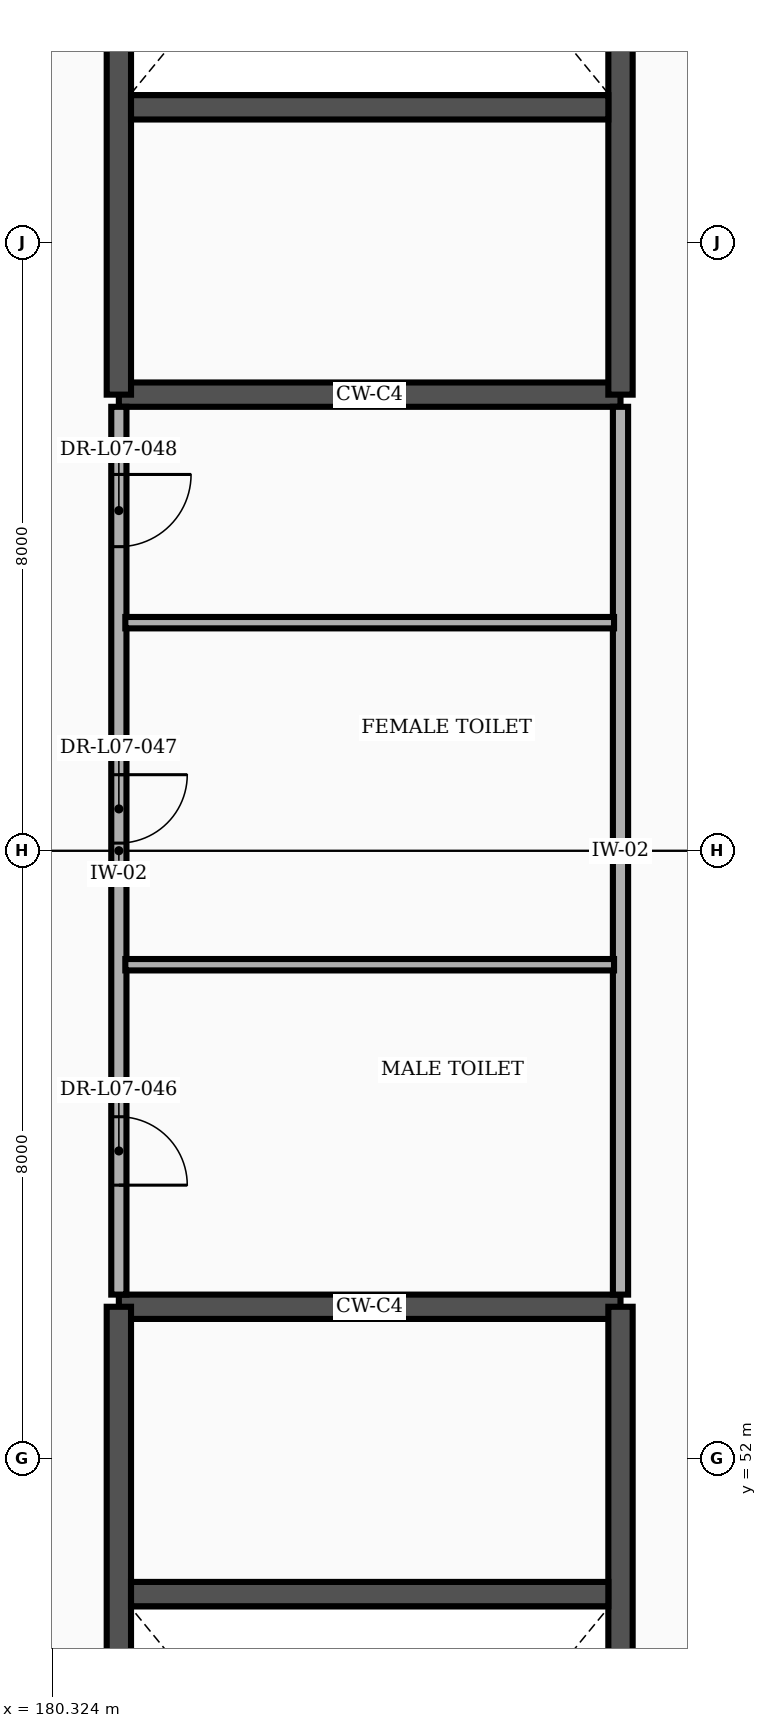
"""IFC4 building model, lengths in metres.
Left out: names, types, materials, properties, quantities, classifications, styles, units other than length and angle.
Written with IfcOpenShell. Run it as: python <this file> out.ifc"""

import sys

from ifc_helpers import new_model, si_unit, direction, frame, frame_2d, origin, place, context, subcontext, project, spatial, rectangle, extrude, element, fill, save


model = new_model("IFC4")
c1 = context("Model", 3, precision=1e-05, world=origin(), true_north=direction((0.0, 1.0)))
c2 = subcontext(c1, "Body", "Model", "MODEL_VIEW")
j1 = project(units=[si_unit("LENGTHUNIT", "METRE"), si_unit("PLANEANGLEUNIT", "RADIAN")], contexts=[c1])
p1 = place(None, origin())
s1 = spatial("IfcSite", under=j1, at=p1, CompositionType="ELEMENT")
p2 = place(p1, origin())
s2 = spatial("IfcBuilding", under=s1, at=p2, CompositionType="ELEMENT")
p3 = place(p2, frame((0.0, 0.0, 33.3)))
s3 = spatial("IfcBuildingStorey", under=s2, at=p3, CompositionType="ELEMENT", Elevation=33.3)
p4 = place(p3, frame((181.2, 54.0, 0.0), z_axis=(0.0, 0.0, 1.0), x_axis=(1.0, 0.0, 0.0)))
e1 = element("IfcWall", 1, at=p4, inside=s3, PredefinedType="SHEAR", context=c2, shape_type="SweptSolid", body=[
    extrude(rectangle(XDim=6.6, YDim=0.32, at=frame_2d((3.3, 0.0))), origin(), (0.0, 0.0, 1.0), 4.255),
])
p5 = place(p3, frame((181.2, 39.4, 0.0), z_axis=(0.0, 0.0, 1.0), x_axis=(0.0, 1.0, 0.0)))
e2 = element("IfcWall", 2, at=p5, inside=s3, PredefinedType="SHEAR", context=c2, shape_type="SweptSolid", body=[
    extrude(rectangle(XDim=14.6, YDim=0.32, at=frame_2d((7.3, 0.0))), origin(), (0.0, 0.0, 1.0), 4.255),
])
p6 = place(p5, frame((0.55, 0.0, 0.0)))
e3 = element("IfcOpeningElement", 3, at=p6, cuts=e2, PredefinedType="OPENING", context=c2, shape_type="SweptSolid", body=[
    extrude(rectangle(XDim=2.4, YDim=2.25, at=frame_2d((1.2, 1.125))), frame((0.0, 0.172, 0.0), z_axis=(0.0, -1.0, 0.0), x_axis=(1.0, 0.0, 0.0)), (0.0, 0.0, 1.0), 0.344),
])
p7 = place(p3, frame((187.8, 39.4, 0.0), z_axis=(0.0, 0.0, 1.0), x_axis=(0.0, 1.0, 0.0)))
e4 = element("IfcWall", 4, at=p7, inside=s3, PredefinedType="SHEAR", context=c2, shape_type="SweptSolid", body=[
    extrude(rectangle(XDim=14.6, YDim=0.32, at=frame_2d((7.3, 0.0))), origin(), (0.0, 0.0, 1.0), 4.255),
])
p8 = place(p3, frame((181.36, 50.22, 0.0), z_axis=(0.0, 0.0, 1.0), x_axis=(1.0, 0.0, 0.0)))
e5 = element("IfcWall", 5, at=p8, inside=s3, PredefinedType="SHEAR", context=c2, shape_type="SweptSolid", body=[
    extrude(rectangle(XDim=6.28, YDim=0.32, at=frame_2d((3.14, 0.0))), origin(), (0.0, 0.0, 1.0), 4.255),
])
p9 = place(p3, frame((181.2, 66.0, 0.0), z_axis=(0.0, 0.0, 1.0), x_axis=(1.0, 0.0, 0.0)))
e6 = element("IfcWall", 6, at=p9, inside=s3, PredefinedType="SHEAR", context=c2, shape_type="SweptSolid", body=[
    extrude(rectangle(XDim=6.6, YDim=0.32, at=frame_2d((3.3, 0.0))), origin(), (0.0, 0.0, 1.0), 4.255),
])
p10 = place(p3, frame((181.2, 66.0, 0.0), z_axis=(0.0, 0.0, 1.0), x_axis=(0.0, 1.0, 0.0)))
e7 = element("IfcWall", 7, at=p10, inside=s3, PredefinedType="SHEAR", context=c2, shape_type="SweptSolid", body=[
    extrude(rectangle(XDim=14.6, YDim=0.32, at=frame_2d((7.3, 0.0))), origin(), (0.0, 0.0, 1.0), 4.255),
])
p11 = place(p10, frame((11.65, 0.0, 0.0)))
e8 = element("IfcOpeningElement", 8, at=p11, cuts=e7, PredefinedType="OPENING", context=c2, shape_type="SweptSolid", body=[
    extrude(rectangle(XDim=2.4, YDim=2.25, at=frame_2d((1.2, 1.125))), frame((0.0, 0.172, 0.0), z_axis=(0.0, -1.0, 0.0), x_axis=(1.0, 0.0, 0.0)), (0.0, 0.0, 1.0), 0.344),
])
p12 = place(p3, frame((187.8, 66.0, 0.0), z_axis=(0.0, 0.0, 1.0), x_axis=(0.0, 1.0, 0.0)))
e9 = element("IfcWall", 9, at=p12, inside=s3, PredefinedType="SHEAR", context=c2, shape_type="SweptSolid", body=[
    extrude(rectangle(XDim=14.6, YDim=0.32, at=frame_2d((7.3, 0.0))), origin(), (0.0, 0.0, 1.0), 4.255),
])
p13 = place(p3, frame((181.36, 69.78, 0.0), z_axis=(0.0, 0.0, 1.0), x_axis=(1.0, 0.0, 0.0)))
e10 = element("IfcWall", 10, at=p13, inside=s3, PredefinedType="SHEAR", context=c2, shape_type="SweptSolid", body=[
    extrude(rectangle(XDim=6.28, YDim=0.32, at=frame_2d((3.14, 0.0))), origin(), (0.0, 0.0, 1.0), 4.255),
])
p14 = place(p3, frame((187.8, 54.16, 0.0), z_axis=(0.0, 0.0, 1.0), x_axis=(0.0, 1.0, 0.0)))
e11 = element("IfcWall", 11, at=p14, inside=s3, PredefinedType="PARTITIONING", context=c2, shape_type="SweptSolid", body=[
    extrude(rectangle(XDim=11.68, YDim=0.2, at=frame_2d((5.84, 0.0))), origin(), (0.0, 0.0, 1.0), 4.255),
])
p15 = place(p3, frame((181.2, 54.16, 0.0), z_axis=(0.0, 0.0, 1.0), x_axis=(0.0, 1.0, 0.0)))
e12 = element("IfcWall", 12, at=p15, inside=s3, PredefinedType="PARTITIONING", context=c2, shape_type="SweptSolid", body=[
    extrude(rectangle(XDim=11.68, YDim=0.2, at=frame_2d((5.84, 0.0))), origin(), (0.0, 0.0, 1.0), 4.255),
])
p16 = place(p15, frame((1.44, 0.0, 0.0)))
e13 = element("IfcOpeningElement", 13, at=p16, cuts=e12, PredefinedType="OPENING", context=c2, shape_type="SweptSolid", body=[
    extrude(rectangle(XDim=0.9, YDim=2.1, at=frame_2d((0.45, 1.05))), frame((0.0, 0.112, 0.0), z_axis=(0.0, -1.0, 0.0), x_axis=(1.0, 0.0, 0.0)), (0.0, 0.0, 1.0), 0.224),
])
p17 = place(p15, frame((5.94, 0.0, 0.0)))
e14 = element("IfcOpeningElement", 14, at=p17, cuts=e12, PredefinedType="OPENING", context=c2, shape_type="SweptSolid", body=[
    extrude(rectangle(XDim=0.9, YDim=2.1, at=frame_2d((0.45, 1.05))), frame((0.0, 0.112, 0.0), z_axis=(0.0, -1.0, 0.0), x_axis=(1.0, 0.0, 0.0)), (0.0, 0.0, 1.0), 0.224),
])
p18 = place(p15, frame((9.84, 0.0, 0.0)))
e15 = element("IfcOpeningElement", 15, at=p18, cuts=e12, PredefinedType="OPENING", context=c2, shape_type="SweptSolid", body=[
    extrude(rectangle(XDim=0.95, YDim=2.1, at=frame_2d((0.475, 1.05))), frame((0.0, 0.112, 0.0), z_axis=(0.0, -1.0, 0.0), x_axis=(1.0, 0.0, 0.0)), (0.0, 0.0, 1.0), 0.224),
])
for number, where, z_axis, x_axis in (
    (16, (181.285, 58.5, 0.0), (0.0, 0.0, 1.0), (1.0, 0.0, 0.0)),
    (17, (181.285, 63.0, 0.0), (0.0, 0.0, 1.0), (1.0, 0.0, 0.0)),
):
    element("IfcWall", number, at=place(p3, frame(where, z_axis=z_axis, x_axis=x_axis)), inside=s3, PredefinedType="PARTITIONING", context=c2, shape_type="SweptSolid", body=[
        extrude(rectangle(XDim=6.43, YDim=0.15, at=frame_2d((3.215, 0.0))), origin(), (0.0, 0.0, 1.0), 4.255),
    ])
p19 = place(p16, frame((0.9, 0.0, 0.0), z_axis=(0.0, 0.0, 1.0), x_axis=(-1.0, 0.0, 0.0)))
e18 = element("IfcDoor", 18, at=p19, inside=s3, OperationType="SINGLE_SWING_RIGHT", PredefinedType="DOOR", context=c2, shape_type="SweptSolid", body=[
    extrude(rectangle(XDim=0.9, YDim=2.1, at=frame_2d((0.45, 1.05))), frame((0.0, 0.025, 0.0), z_axis=(0.0, -1.0, 0.0), x_axis=(1.0, 0.0, 0.0)), (0.0, 0.0, 1.0), 0.05),
])
fill(e13, e18)
p20 = place(p17, frame((0.9, 0.0, 0.0), z_axis=(0.0, 0.0, 1.0), x_axis=(-1.0, 0.0, 0.0)))
e19 = element("IfcDoor", 19, at=p20, inside=s3, OperationType="SINGLE_SWING_LEFT", PredefinedType="DOOR", context=c2, shape_type="SweptSolid", body=[
    extrude(rectangle(XDim=0.9, YDim=2.1, at=frame_2d((0.45, 1.05))), frame((0.0, 0.025, 0.0), z_axis=(0.0, -1.0, 0.0), x_axis=(1.0, 0.0, 0.0)), (0.0, 0.0, 1.0), 0.05),
])
fill(e14, e19)
p21 = place(p18, frame((0.95, 0.0, 0.0), z_axis=(0.0, 0.0, 1.0), x_axis=(-1.0, 0.0, 0.0)))
e20 = element("IfcDoor", 20, at=p21, inside=s3, OperationType="SINGLE_SWING_LEFT", PredefinedType="DOOR", context=c2, shape_type="SweptSolid", body=[
    extrude(rectangle(XDim=0.95, YDim=2.1, at=frame_2d((0.475, 1.05))), frame((0.0, 0.025, 0.0), z_axis=(0.0, -1.0, 0.0), x_axis=(1.0, 0.0, 0.0)), (0.0, 0.0, 1.0), 0.05),
])
fill(e15, e20)
save(model, sys.argv[1])
